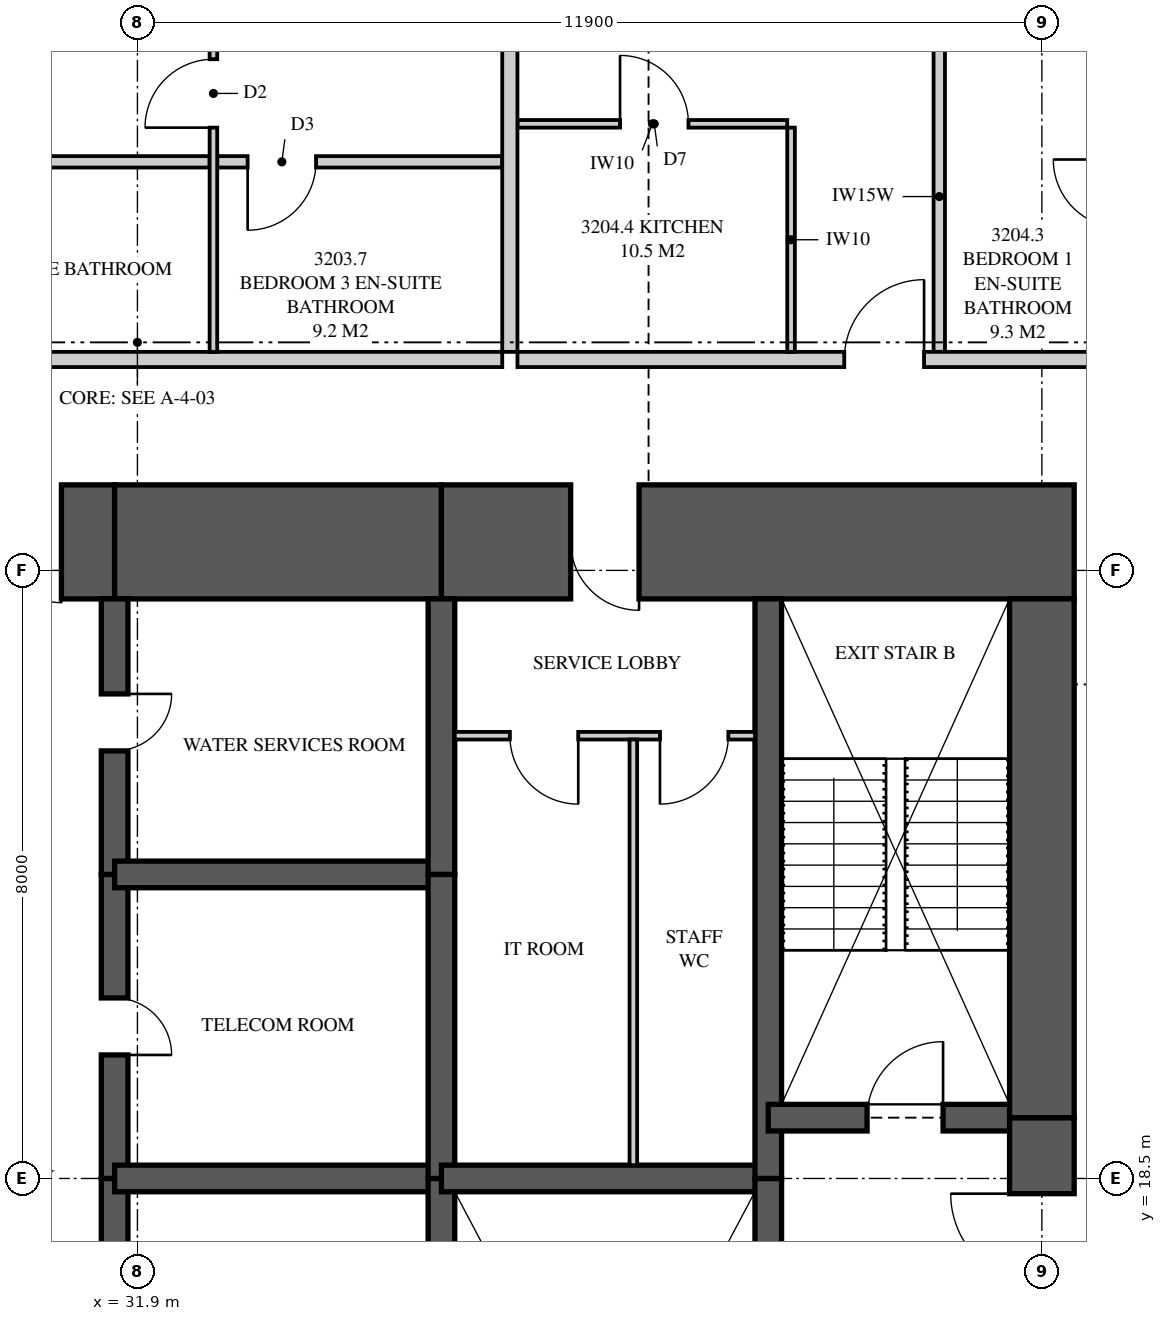
"""IFC4 building model, lengths in metres.
Left out: names, types, materials, properties, quantities, classifications, styles, units other than length and angle.
Written with IfcOpenShell. Run it as: python <this file> out.ifc"""

import sys

from ifc_helpers import new_model, si_unit, direction, frame, frame_2d, origin, place, context, subcontext, project, spatial, polyline, rectangle, outline, extrude, element, fill, save


model = new_model("IFC4")
c1 = context("Model", 3, precision=1e-05, world=origin(), true_north=direction((0.0, 1.0)))
c2 = subcontext(c1, "Body", "Model", "MODEL_VIEW")
j1 = project(units=[si_unit("LENGTHUNIT", "METRE"), si_unit("PLANEANGLEUNIT", "RADIAN")], contexts=[c1])
p1 = place(None, origin())
s1 = spatial("IfcSite", under=j1, at=p1, CompositionType="ELEMENT")
p2 = place(p1, origin())
s2 = spatial("IfcBuilding", under=s1, at=p2, CompositionType="ELEMENT")
p3 = place(p2, frame((0.0, 0.0, 118.25)))
s3 = spatial("IfcBuildingStorey", under=s2, at=p3, CompositionType="ELEMENT", Elevation=118.25)
p4 = place(p3, frame((44.225, 26.875, 0.0), z_axis=(0.0, 0.0, 1.0), x_axis=(-1.0, 0.0, 0.0)))
e1 = element("IfcWall", 1, at=p4, inside=s3, PredefinedType="SHEAR", context=c2, shape_type="SweptSolid", body=[
    extrude(rectangle(XDim=8.325, YDim=1.5, at=frame_2d((4.163, 0.0))), origin(), (0.0, 0.0, 1.0), 3.35),
])
p5 = place(p4, frame((5.725, 0.0, 0.0)))
e2 = element("IfcOpeningElement", 2, at=p5, cuts=e1, PredefinedType="OPENING", context=c2, shape_type="SweptSolid", body=[
    extrude(rectangle(XDim=0.9, YDim=2.1, at=frame_2d((0.45, 1.05))), frame((0.0, 0.76, 0.0), z_axis=(0.0, -1.0, 0.0), x_axis=(1.0, 0.0, 0.0)), (0.0, 0.0, 1.0), 1.52),
])
p6 = place(p3, frame((35.9, 26.875, 0.0), z_axis=(0.0, 0.0, 1.0), x_axis=(-1.0, 0.0, 0.0)))
e3 = element("IfcWall", 3, at=p6, inside=s3, PredefinedType="SHEAR", context=c2, shape_type="SweptSolid", body=[
    extrude(rectangle(XDim=4.3, YDim=1.5, at=frame_2d((2.15, 0.0))), origin(), (0.0, 0.0, 1.0), 3.35),
])
p7 = place(p3, frame((31.6, 26.875, 0.0), z_axis=(0.0, 0.0, 1.0), x_axis=(-1.0, 0.0, 0.0)))
e4 = element("IfcWall", 4, at=p7, inside=s3, PredefinedType="SHEAR", context=c2, shape_type="SweptSolid", body=[
    extrude(rectangle(XDim=5.6, YDim=1.5, at=frame_2d((2.8, 0.0))), origin(), (0.0, 0.0, 1.0), 3.35),
])
p8 = place(p7, frame((0.7, 0.0, 0.0)))
e5 = element("IfcOpeningElement", 5, at=p8, cuts=e4, PredefinedType="OPENING", context=c2, shape_type="SweptSolid", body=[
    extrude(rectangle(XDim=1.6, YDim=2.1, at=frame_2d((0.8, 1.05))), frame((0.0, 0.76, 0.0), z_axis=(0.0, -1.0, 0.0), x_axis=(1.0, 0.0, 0.0)), (0.0, 0.0, 1.0), 1.52),
])
p9 = place(p3, frame((43.8, 13.0, 0.0), z_axis=(0.0, 0.0, 1.0), x_axis=(0.0, 1.0, 0.0)))
e6 = element("IfcWall", 6, at=p9, inside=s3, PredefinedType="SHEAR", context=c2, shape_type="SweptSolid", body=[
    extrude(rectangle(XDim=6.3, YDim=0.85, at=frame_2d((3.15, 0.0))), origin(), (0.0, 0.0, 1.0), 3.35),
])
p10 = place(p9, frame((4.1, 0.0, 0.0)))
e7 = element("IfcOpeningElement", 7, at=p10, cuts=e6, PredefinedType="OPENING", context=c2, shape_type="SweptSolid", body=[
    extrude(rectangle(XDim=1.2, YDim=2.2, at=frame_2d((0.6, 1.1))), frame((0.0, 0.435, 0.0), z_axis=(0.0, -1.0, 0.0), x_axis=(1.0, 0.0, 0.0)), (0.0, 0.0, 1.0), 0.87),
])
p11 = place(p3, frame((43.8, 19.3, 0.0), z_axis=(0.0, 0.0, 1.0), x_axis=(0.0, 1.0, 0.0)))
e8 = element("IfcWall", 8, at=p11, inside=s3, PredefinedType="SHEAR", context=c2, shape_type="SweptSolid", body=[
    extrude(rectangle(XDim=6.825, YDim=0.85, at=frame_2d((3.413, 0.0))), origin(), (0.0, 0.0, 1.0), 3.35),
])
p12 = place(p3, frame((31.6, 14.5, 0.0), z_axis=(0.0, 0.0, 1.0), x_axis=(0.0, 1.0, 0.0)))
e9 = element("IfcWall", 9, at=p12, inside=s3, PredefinedType="SHEAR", context=c2, shape_type="SweptSolid", body=[
    extrude(rectangle(XDim=4.0, YDim=0.35, at=frame_2d((2.0, 0.0))), origin(), (0.0, 0.0, 1.0), 3.35),
])
p13 = place(p12, frame((1.625, 0.0, 0.0)))
e10 = element("IfcOpeningElement", 10, at=p13, cuts=e9, PredefinedType="OPENING", context=c2, shape_type="SweptSolid", body=[
    extrude(rectangle(XDim=0.75, YDim=2.1, at=frame_2d((0.375, 1.05))), frame((0.0, 0.185, 0.0), z_axis=(0.0, -1.0, 0.0), x_axis=(1.0, 0.0, 0.0)), (0.0, 0.0, 1.0), 0.37),
])
p14 = place(p3, frame((31.6, 18.5, 0.0), z_axis=(0.0, 0.0, 1.0), x_axis=(0.0, 1.0, 0.0)))
e11 = element("IfcWall", 11, at=p14, inside=s3, PredefinedType="SHEAR", context=c2, shape_type="SweptSolid", body=[
    extrude(rectangle(XDim=4.0, YDim=0.35, at=frame_2d((2.0, 0.0))), origin(), (0.0, 0.0, 1.0), 3.35),
])
p15 = place(p14, frame((1.625, 0.0, 0.0)))
e12 = element("IfcOpeningElement", 12, at=p15, cuts=e11, PredefinedType="OPENING", context=c2, shape_type="SweptSolid", body=[
    extrude(rectangle(XDim=0.75, YDim=2.1, at=frame_2d((0.375, 1.05))), frame((0.0, 0.185, 0.0), z_axis=(0.0, -1.0, 0.0), x_axis=(1.0, 0.0, 0.0)), (0.0, 0.0, 1.0), 0.37),
])
p16 = place(p3, frame((31.6, 22.5, 0.0), z_axis=(0.0, 0.0, 1.0), x_axis=(0.0, 1.0, 0.0)))
e13 = element("IfcWall", 13, at=p16, inside=s3, PredefinedType="SHEAR", context=c2, shape_type="SweptSolid", body=[
    extrude(rectangle(XDim=3.625, YDim=0.35, at=frame_2d((1.812, 0.0))), origin(), (0.0, 0.0, 1.0), 3.35),
])
p17 = place(p16, frame((1.625, 0.0, 0.0)))
e14 = element("IfcOpeningElement", 14, at=p17, cuts=e13, PredefinedType="OPENING", context=c2, shape_type="SweptSolid", body=[
    extrude(rectangle(XDim=0.75, YDim=2.1, at=frame_2d((0.375, 1.05))), frame((0.0, 0.185, 0.0), z_axis=(0.0, -1.0, 0.0), x_axis=(1.0, 0.0, 0.0)), (0.0, 0.0, 1.0), 0.37),
])
for number, where, z_axis, x_axis in (
    (15, (35.9, 14.5, 0.0), (0.0, 0.0, 1.0), (0.0, 1.0, 0.0)),
    (16, (35.9, 18.5, 0.0), (0.0, 0.0, 1.0), (0.0, 1.0, 0.0)),
):
    element("IfcWall", number, at=place(p3, frame(where, z_axis=z_axis, x_axis=x_axis)), inside=s3, PredefinedType="SHEAR", context=c2, shape_type="SweptSolid", body=[
        extrude(rectangle(XDim=4.0, YDim=0.35, at=frame_2d((2.0, 0.0))), origin(), (0.0, 0.0, 1.0), 3.35),
    ])
p18 = place(p3, frame((35.9, 22.5, 0.0), z_axis=(0.0, 0.0, 1.0), x_axis=(0.0, 1.0, 0.0)))
e17 = element("IfcWall", 17, at=p18, inside=s3, PredefinedType="SHEAR", context=c2, shape_type="SweptSolid", body=[
    extrude(rectangle(XDim=3.625, YDim=0.35, at=frame_2d((1.812, 0.0))), origin(), (0.0, 0.0, 1.0), 3.35),
])
p19 = place(p3, frame((40.2, 13.7, 0.0), z_axis=(0.0, 0.0, 1.0), x_axis=(0.0, 1.0, 0.0)))
e18 = element("IfcWall", 18, at=p19, inside=s3, PredefinedType="SHEAR", context=c2, shape_type="SweptSolid", body=[
    extrude(rectangle(XDim=4.8, YDim=0.35, at=frame_2d((2.4, 0.0))), origin(), (0.0, 0.0, 1.0), 3.35),
])
p20 = place(p3, frame((40.2, 18.5, 0.0), z_axis=(0.0, 0.0, 1.0), x_axis=(0.0, 1.0, 0.0)))
e19 = element("IfcWall", 19, at=p20, inside=s3, PredefinedType="SHEAR", context=c2, shape_type="SweptSolid", body=[
    extrude(rectangle(XDim=7.625, YDim=0.35, at=frame_2d((3.812, 0.0))), origin(), (0.0, 0.0, 1.0), 3.35),
])
for number, where, z_axis, x_axis in (
    (20, (31.6, 18.5, 0.0), (0.0, 0.0, 1.0), (1.0, 0.0, 0.0)),
    (21, (31.6, 22.5, 0.0), (0.0, 0.0, 1.0), (1.0, 0.0, 0.0)),
):
    element("IfcWall", number, at=place(p3, frame(where, z_axis=z_axis, x_axis=x_axis)), inside=s3, PredefinedType="SHEAR", context=c2, shape_type="SweptSolid", body=[
        extrude(rectangle(XDim=4.3, YDim=0.35, at=frame_2d((2.15, 0.0))), origin(), (0.0, 0.0, 1.0), 3.35),
    ])
p21 = place(p3, frame((35.9, 18.5, 0.0), z_axis=(0.0, 0.0, 1.0), x_axis=(1.0, 0.0, 0.0)))
e22 = element("IfcWall", 22, at=p21, inside=s3, PredefinedType="SHEAR", context=c2, shape_type="SweptSolid", body=[
    extrude(rectangle(XDim=4.3, YDim=0.35, at=frame_2d((2.15, 0.0))), origin(), (0.0, 0.0, 1.0), 3.35),
])
p22 = place(p3, frame((40.2, 19.3, 0.0), z_axis=(0.0, 0.0, 1.0), x_axis=(1.0, 0.0, 0.0)))
e23 = element("IfcWall", 23, at=p22, inside=s3, PredefinedType="SHEAR", context=c2, shape_type="SweptSolid", body=[
    extrude(rectangle(XDim=3.6, YDim=0.35, at=frame_2d((1.8, 0.0))), origin(), (0.0, 0.0, 1.0), 3.35),
])
p23 = place(p22, frame((1.3, 0.0, 0.0)))
e24 = element("IfcOpeningElement", 24, at=p23, cuts=e23, PredefinedType="OPENING", context=c2, shape_type="SweptSolid", body=[
    extrude(rectangle(XDim=1.0, YDim=2.1, at=frame_2d((0.5, 1.05))), frame((0.0, 0.185, 0.0), z_axis=(0.0, -1.0, 0.0), x_axis=(1.0, 0.0, 0.0)), (0.0, 0.0, 1.0), 0.37),
])
p24 = place(p3, frame((36.8, 37.825, 0.0), z_axis=(0.0, 0.0, 1.0), x_axis=(0.0, -1.0, 0.0)))
e25 = element("IfcWall", 25, at=p24, inside=s3, PredefinedType="PARTITIONING", context=c2, shape_type="SweptSolid", body=[
    extrude(outline(polyline([(0.529, 2.15), (0.0, 2.15), (0.0, 0.0), (0.529, 0.0), (0.529, 0.256), (1.021, 0.256), (1.021, 0.0), (8.45, 0.0), (8.45, 3.11), (1.685, 3.11), (1.685, 2.15), (1.021, 2.15), (1.021, 1.894), (0.529, 1.894), (0.529, 2.15)])), frame((0.0, 0.1, 0.0), z_axis=(0.0, -1.0, 0.0), x_axis=(1.0, 0.0, 0.0)), (0.0, 0.0, 1.0), 0.2),
])
p25 = place(p3, frame((17.775, 29.275, 0.0), z_axis=(0.0, 0.0, 1.0), x_axis=(1.0, 0.0, 0.0)))
e26 = element("IfcWall", 26, at=p25, inside=s3, PredefinedType="PARTITIONING", context=c2, shape_type="SweptSolid", body=[
    extrude(outline(polyline([(0.0, 0.0), (18.925, 0.0), (18.925, 3.11), (10.312, 3.11), (10.312, 2.541), (9.638, 2.541), (9.638, 3.11), (0.0, 3.11), (0.0, 0.0)])), frame((0.0, 0.1, 0.0), z_axis=(0.0, -1.0, 0.0), x_axis=(1.0, 0.0, 0.0)), (0.0, 0.0, 1.0), 0.2),
])
p26 = place(p25, frame((3.125, 0.0, 0.0)))
e27 = element("IfcOpeningElement", 27, at=p26, cuts=e26, PredefinedType="OPENING", context=c2, shape_type="SweptSolid", body=[
    extrude(rectangle(XDim=1.05, YDim=2.2, at=frame_2d((0.525, 1.1))), frame((0.0, 0.11, 0.0), z_axis=(0.0, -1.0, 0.0), x_axis=(1.0, 0.0, 0.0)), (0.0, 0.0, 1.0), 0.22),
])
p27 = place(p3, frame((32.9, 37.825, 0.0), z_axis=(0.0, 0.0, 1.0), x_axis=(0.0, -1.0, 0.0)))
e28 = element("IfcWall", 28, at=p27, inside=s3, PredefinedType="PARTITIONING", context=c2, shape_type="SweptSolid", body=[
    extrude(outline(polyline([(0.0, 0.0), (8.45, 0.0), (8.45, 3.11), (1.635, 3.11), (1.635, 2.15), (0.0, 2.15), (0.0, 3.11), (0.0, 0.0)])), frame((0.0, 0.05, 0.0), z_axis=(0.0, -1.0, 0.0), x_axis=(1.0, 0.0, 0.0)), (0.0, 0.0, 1.0), 0.1),
])
p28 = place(p27, frame((4.6, 0.0, 0.0)))
e29 = element("IfcOpeningElement", 29, at=p28, cuts=e28, PredefinedType="OPENING", context=c2, shape_type="SweptSolid", body=[
    extrude(rectangle(XDim=0.9, YDim=2.1, at=frame_2d((0.45, 1.05))), frame((0.0, 0.06, 0.0), z_axis=(0.0, -1.0, 0.0), x_axis=(1.0, 0.0, 0.0)), (0.0, 0.0, 1.0), 0.12),
])
p29 = place(p3, frame((26.95, 31.875, 0.0), z_axis=(0.0, 0.0, 1.0), x_axis=(1.0, 0.0, 0.0)))
e30 = element("IfcWall", 30, at=p29, inside=s3, PredefinedType="PLUMBINGWALL", context=c2, shape_type="SweptSolid", body=[
    extrude(outline(polyline([(0.0, 0.0), (5.9, 0.0), (5.9, 3.11), (1.112, 3.11), (1.112, 2.541), (0.488, 2.541), (0.488, 3.11), (0.0, 3.11), (0.0, 0.0)])), frame((0.0, 0.075, 0.0), z_axis=(0.0, -1.0, 0.0), x_axis=(1.0, 0.0, 0.0)), (0.0, 0.0, 1.0), 0.15),
])
p30 = place(p29, frame((0.4, 0.0, 0.0)))
e31 = element("IfcOpeningElement", 31, at=p30, cuts=e30, PredefinedType="OPENING", context=c2, shape_type="SweptSolid", body=[
    extrude(rectangle(XDim=0.9, YDim=2.1, at=frame_2d((0.45, 1.05))), frame((0.0, 0.085, 0.0), z_axis=(0.0, -1.0, 0.0), x_axis=(1.0, 0.0, 0.0)), (0.0, 0.0, 1.0), 0.17),
])
p31 = place(p3, frame((32.95, 31.875, 0.0), z_axis=(0.0, 0.0, 1.0), x_axis=(1.0, 0.0, 0.0)))
e32 = element("IfcWall", 32, at=p31, inside=s3, PredefinedType="PLUMBINGWALL", context=c2, shape_type="SweptSolid", body=[
    extrude(rectangle(XDim=3.75, YDim=0.15, at=frame_2d((1.875, 0.0))), origin(), (0.0, 0.0, 1.0), 3.11),
])
p32 = place(p31, frame((0.4, 0.0, 0.0)))
e33 = element("IfcOpeningElement", 33, at=p32, cuts=e32, PredefinedType="OPENING", context=c2, shape_type="SweptSolid", body=[
    extrude(rectangle(XDim=0.9, YDim=2.1, at=frame_2d((0.45, 1.05))), frame((0.0, 0.085, 0.0), z_axis=(0.0, -1.0, 0.0), x_axis=(1.0, 0.0, 0.0)), (0.0, 0.0, 1.0), 0.17),
])
p33 = place(p3, frame((36.9, 29.275, 0.0), z_axis=(0.0, 0.0, 1.0), x_axis=(1.0, 0.0, 0.0)))
e34 = element("IfcWall", 34, at=p33, inside=s3, PredefinedType="PARTITIONING", context=c2, shape_type="SweptSolid", body=[
    extrude(outline(polyline([(0.0, 0.0), (9.125, 0.0), (9.125, 3.11), (2.062, 3.11), (2.062, 2.541), (1.388, 2.541), (1.388, 3.11), (0.0, 3.11), (0.0, 0.0)])), frame((0.0, 0.1, 0.0), z_axis=(0.0, -1.0, 0.0), x_axis=(1.0, 0.0, 0.0)), (0.0, 0.0, 1.0), 0.2),
])
p34 = place(p33, frame((4.3, 0.0, 0.0)))
e35 = element("IfcOpeningElement", 35, at=p34, cuts=e34, PredefinedType="OPENING", context=c2, shape_type="SweptSolid", body=[
    extrude(rectangle(XDim=1.05, YDim=2.2, at=frame_2d((0.525, 1.1))), frame((0.0, 0.11, 0.0), z_axis=(0.0, -1.0, 0.0), x_axis=(1.0, 0.0, 0.0)), (0.0, 0.0, 1.0), 0.22),
])
p35 = place(p3, frame((42.45, 33.461, 0.0), z_axis=(0.0, 0.0, 1.0), x_axis=(0.0, -1.0, 0.0)))
e36 = element("IfcWall", 36, at=p35, inside=s3, PredefinedType="PLUMBINGWALL", context=c2, shape_type="SweptSolid", body=[
    extrude(rectangle(XDim=4.086, YDim=0.15, at=frame_2d((2.043, 0.0))), origin(), (0.0, 0.0, 1.0), 3.11),
])
p36 = place(p3, frame((36.9, 32.375, 0.0), z_axis=(0.0, 0.0, 1.0), x_axis=(1.0, 0.0, 0.0)))
e37 = element("IfcWall", 37, at=p36, inside=s3, PredefinedType="PARTITIONING", context=c2, shape_type="SweptSolid", body=[
    extrude(outline(polyline([(0.0, 0.0), (3.55, 0.0), (3.55, 3.11), (2.012, 3.11), (2.012, 2.541), (1.438, 2.541), (1.438, 3.11), (0.0, 3.11), (0.0, 0.0)])), frame((0.0, 0.05, 0.0), z_axis=(0.0, -1.0, 0.0), x_axis=(1.0, 0.0, 0.0)), (0.0, 0.0, 1.0), 0.1),
])
p37 = place(p36, frame((1.35, 0.0, 0.0)))
e38 = element("IfcOpeningElement", 38, at=p37, cuts=e37, PredefinedType="OPENING", context=c2, shape_type="SweptSolid", body=[
    extrude(rectangle(XDim=0.9, YDim=2.1, at=frame_2d((0.45, 1.05))), frame((0.0, 0.06, 0.0), z_axis=(0.0, -1.0, 0.0), x_axis=(1.0, 0.0, 0.0)), (0.0, 0.0, 1.0), 0.12),
])
p38 = place(p3, frame((40.5, 32.325, 0.0), z_axis=(0.0, 0.0, 1.0), x_axis=(0.0, -1.0, 0.0)))
e39 = element("IfcWall", 39, at=p38, inside=s3, PredefinedType="PARTITIONING", context=c2, shape_type="SweptSolid", body=[
    extrude(rectangle(XDim=2.95, YDim=0.1, at=frame_2d((1.475, 0.0))), origin(), (0.0, 0.0, 1.0), 3.11),
])
p39 = place(p3, frame((36.075, 24.325, 0.0), z_axis=(0.0, 0.0, 1.0), x_axis=(1.0, 0.0, 0.0)))
e40 = element("IfcWall", 40, at=p39, inside=s3, PredefinedType="PARTITIONING", context=c2, shape_type="SweptSolid", body=[
    extrude(rectangle(XDim=3.95, YDim=0.1, at=frame_2d((1.975, 0.0))), origin(), (0.0, 0.0, 1.0), 3.11),
])
p40 = place(p39, frame((0.725, 0.0, 0.0)))
e41 = element("IfcOpeningElement", 41, at=p40, cuts=e40, PredefinedType="OPENING", context=c2, shape_type="SweptSolid", body=[
    extrude(rectangle(XDim=0.9, YDim=2.1, at=frame_2d((0.45, 1.05))), frame((0.0, 0.06, 0.0), z_axis=(0.0, -1.0, 0.0), x_axis=(1.0, 0.0, 0.0)), (0.0, 0.0, 1.0), 0.12),
])
p41 = place(p39, frame((2.7, 0.0, 0.0)))
e42 = element("IfcOpeningElement", 42, at=p41, cuts=e40, PredefinedType="OPENING", context=c2, shape_type="SweptSolid", body=[
    extrude(rectangle(XDim=0.9, YDim=2.1, at=frame_2d((0.45, 1.05))), frame((0.0, 0.06, 0.0), z_axis=(0.0, -1.0, 0.0), x_axis=(1.0, 0.0, 0.0)), (0.0, 0.0, 1.0), 0.12),
])
p42 = place(p3, frame((38.425, 18.675, 0.0), z_axis=(0.0, 0.0, 1.0), x_axis=(0.0, 1.0, 0.0)))
e43 = element("IfcWall", 43, at=p42, inside=s3, PredefinedType="PARTITIONING", context=c2, shape_type="SweptSolid", body=[
    extrude(rectangle(XDim=5.6, YDim=0.1, at=frame_2d((2.8, 0.0))), origin(), (0.0, 0.0, 1.0), 3.11),
])
p43 = place(p28, frame((0.9, 0.0, 0.0), z_axis=(0.0, 0.0, 1.0), x_axis=(-1.0, 0.0, 0.0)))
e44 = element("IfcDoor", 44, at=p43, inside=s3, OperationType="SINGLE_SWING_LEFT", PredefinedType="DOOR", context=c2, shape_type="SweptSolid", body=[
    extrude(rectangle(XDim=0.9, YDim=2.1, at=frame_2d((0.45, 1.05))), frame((0.0, 0.025, 0.0), z_axis=(0.0, -1.0, 0.0), x_axis=(1.0, 0.0, 0.0)), (0.0, 0.0, 1.0), 0.05),
])
fill(e29, e44)
p44 = place(p32, frame((0.9, 0.0, 0.0), z_axis=(0.0, 0.0, 1.0), x_axis=(-1.0, 0.0, 0.0)))
e45 = element("IfcDoor", 45, at=p44, inside=s3, OperationType="SINGLE_SWING_RIGHT", PredefinedType="DOOR", context=c2, shape_type="SweptSolid", body=[
    extrude(rectangle(XDim=0.9, YDim=2.1, at=frame_2d((0.45, 1.05))), frame((0.0, 0.025, 0.0), z_axis=(0.0, -1.0, 0.0), x_axis=(1.0, 0.0, 0.0)), (0.0, 0.0, 1.0), 0.05),
])
fill(e33, e45)
p45 = place(p34, origin())
e46 = element("IfcDoor", 46, at=p45, inside=s3, OperationType="SINGLE_SWING_RIGHT", PredefinedType="DOOR", context=c2, shape_type="SweptSolid", body=[
    extrude(rectangle(XDim=1.05, YDim=2.2, at=frame_2d((0.525, 1.1))), frame((0.0, 0.025, 0.0), z_axis=(0.0, -1.0, 0.0), x_axis=(1.0, 0.0, 0.0)), (0.0, 0.0, 1.0), 0.05),
])
fill(e35, e46)
p46 = place(p37, origin())
e47 = element("IfcDoor", 47, at=p46, inside=s3, OperationType="SINGLE_SWING_LEFT", PredefinedType="DOOR", context=c2, shape_type="SweptSolid", body=[
    extrude(rectangle(XDim=0.9, YDim=2.1, at=frame_2d((0.45, 1.05))), frame((0.0, 0.025, 0.0), z_axis=(0.0, -1.0, 0.0), x_axis=(1.0, 0.0, 0.0)), (0.0, 0.0, 1.0), 0.05),
])
fill(e38, e47)
p47 = place(p40, frame((0.9, 0.0, 0.0), z_axis=(0.0, 0.0, 1.0), x_axis=(-1.0, 0.0, 0.0)))
e48 = element("IfcDoor", 48, at=p47, inside=s3, OperationType="SINGLE_SWING_LEFT", PredefinedType="DOOR", context=c2, shape_type="SweptSolid", body=[
    extrude(rectangle(XDim=0.9, YDim=2.1, at=frame_2d((0.45, 1.05))), frame((0.0, 0.025, 0.0), z_axis=(0.0, -1.0, 0.0), x_axis=(1.0, 0.0, 0.0)), (0.0, 0.0, 1.0), 0.05),
])
fill(e41, e48)
p48 = place(p41, frame((0.9, 0.0, 0.0), z_axis=(0.0, 0.0, 1.0), x_axis=(-1.0, 0.0, 0.0)))
e49 = element("IfcDoor", 49, at=p48, inside=s3, OperationType="SINGLE_SWING_RIGHT", PredefinedType="DOOR", context=c2, shape_type="SweptSolid", body=[
    extrude(rectangle(XDim=0.9, YDim=2.1, at=frame_2d((0.45, 1.05))), frame((0.0, 0.025, 0.0), z_axis=(0.0, -1.0, 0.0), x_axis=(1.0, 0.0, 0.0)), (0.0, 0.0, 1.0), 0.05),
])
fill(e42, e49)
p49 = place(p23, origin())
e50 = element("IfcDoor", 50, at=p49, inside=s3, OperationType="SINGLE_SWING_RIGHT", PredefinedType="DOOR", context=c2, shape_type="SweptSolid", body=[
    extrude(rectangle(XDim=1.0, YDim=2.1, at=frame_2d((0.5, 1.05))), frame((0.0, 0.025, 0.0), z_axis=(0.0, -1.0, 0.0), x_axis=(1.0, 0.0, 0.0)), (0.0, 0.0, 1.0), 0.05),
])
fill(e24, e50)
p50 = place(p10, origin())
e51 = element("IfcDoor", 51, at=p50, inside=s3, OperationType="SINGLE_SWING_RIGHT", PredefinedType="DOOR", context=c2, shape_type="SweptSolid", body=[
    extrude(rectangle(XDim=1.2, YDim=2.2, at=frame_2d((0.6, 1.1))), frame((0.0, 0.025, 0.0), z_axis=(0.0, -1.0, 0.0), x_axis=(1.0, 0.0, 0.0)), (0.0, 0.0, 1.0), 0.05),
])
fill(e7, e51)
p51 = place(p8, origin())
e52 = element("IfcDoor", 52, at=p51, inside=s3, OperationType="DOUBLE_DOOR_SINGLE_SWING", PredefinedType="DOOR", context=c2, shape_type="SweptSolid", body=[
    extrude(rectangle(XDim=1.6, YDim=2.1, at=frame_2d((0.8, 1.05))), frame((0.0, 0.025, 0.0), z_axis=(0.0, -1.0, 0.0), x_axis=(1.0, 0.0, 0.0)), (0.0, 0.0, 1.0), 0.05),
])
fill(e5, e52)
p52 = place(p15, frame((0.75, 0.0, 0.0), z_axis=(0.0, 0.0, 1.0), x_axis=(-1.0, 0.0, 0.0)))
e53 = element("IfcDoor", 53, at=p52, inside=s3, OperationType="SINGLE_SWING_RIGHT", PredefinedType="DOOR", context=c2, shape_type="SweptSolid", body=[
    extrude(rectangle(XDim=0.75, YDim=2.1, at=frame_2d((0.375, 1.05))), frame((0.0, 0.025, 0.0), z_axis=(0.0, -1.0, 0.0), x_axis=(1.0, 0.0, 0.0)), (0.0, 0.0, 1.0), 0.05),
])
fill(e12, e53)
p53 = place(p17, frame((0.75, 0.0, 0.0), z_axis=(0.0, 0.0, 1.0), x_axis=(-1.0, 0.0, 0.0)))
e54 = element("IfcDoor", 54, at=p53, inside=s3, OperationType="SINGLE_SWING_LEFT", PredefinedType="DOOR", context=c2, shape_type="SweptSolid", body=[
    extrude(rectangle(XDim=0.75, YDim=2.1, at=frame_2d((0.375, 1.05))), frame((0.0, 0.025, 0.0), z_axis=(0.0, -1.0, 0.0), x_axis=(1.0, 0.0, 0.0)), (0.0, 0.0, 1.0), 0.05),
])
fill(e14, e54)
p54 = place(p5, origin())
e55 = element("IfcDoor", 55, at=p54, inside=s3, OperationType="SINGLE_SWING_LEFT", PredefinedType="DOOR", context=c2, shape_type="SweptSolid", body=[
    extrude(rectangle(XDim=0.9, YDim=2.1, at=frame_2d((0.45, 1.05))), frame((0.0, 0.47, 0.0), z_axis=(0.0, -1.0, 0.0), x_axis=(1.0, 0.0, 0.0)), (0.0, 0.0, 1.0), 0.8),
])
fill(e2, e55)
save(model, sys.argv[1])
